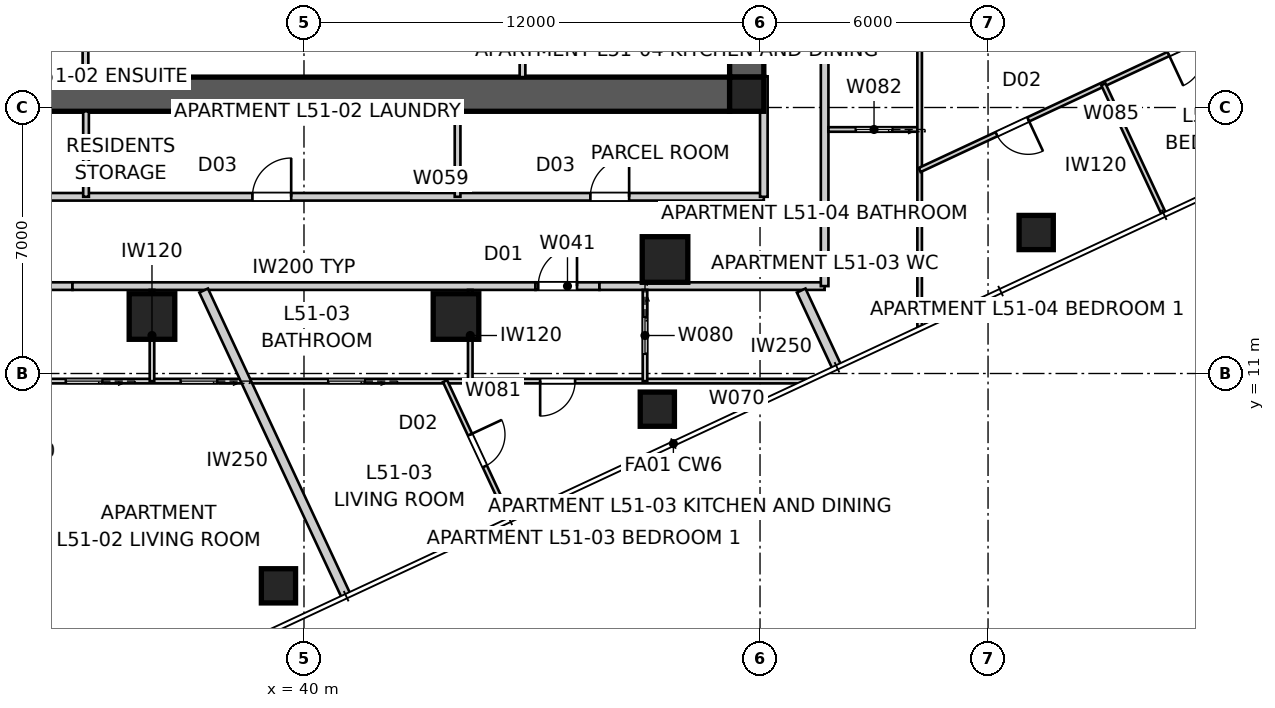
"""IFC4 building model, lengths in metres.
Left out: names, types, materials, properties, quantities, classifications, styles, units other than length and angle.
Written with IfcOpenShell. Run it as: python <this file> out.ifc"""

import sys

from ifc_helpers import new_model, si_unit, direction, frame, frame_2d, origin, origin_2d, place, context, subcontext, project, spatial, polyline, rectangle, outline, extrude, element, fill, save


model = new_model("IFC4")
c1 = context("Model", 3, precision=1e-05, world=origin(), true_north=direction((0.0, 1.0)))
c2 = subcontext(c1, "Body", "Model", "MODEL_VIEW")
j1 = project(units=[si_unit("LENGTHUNIT", "METRE"), si_unit("PLANEANGLEUNIT", "RADIAN")], contexts=[c1])
p1 = place(None, origin())
s1 = spatial("IfcSite", under=j1, at=p1, CompositionType="ELEMENT")
p2 = place(p1, origin())
s2 = spatial("IfcBuilding", under=s1, at=p2, CompositionType="ELEMENT")
p3 = place(p2, frame((0.0, 0.0, 186.2)))
s3 = spatial("IfcBuildingStorey", under=s2, at=p3, CompositionType="ELEMENT", Elevation=186.2)
p4 = place(p3, frame((51.2, 18.35, 0.0), z_axis=(0.0, 0.0, 1.0), x_axis=(-1.0, 0.0, 0.0)))
e1 = element("IfcWall", 1, at=p4, inside=s3, PredefinedType="SHEAR", context=c2, shape_type="SweptSolid", body=[
    extrude(outline(polyline([(0.0, -0.45), (22.4, -0.45), (22.4, -0.025), (22.85, -0.025), (22.85, 0.025), (22.4, 0.025), (22.4, 0.45), (0.0, 0.45), (0.0, 0.025), (-0.45, 0.025), (-0.45, -0.025), (0.0, -0.025), (0.0, -0.45)])), origin(), (0.0, 0.0, 1.0), 3.4),
])
p5 = place(p3, frame((51.65, 18.8, 0.0), z_axis=(0.0, 0.0, 1.0), x_axis=(0.0, 1.0, 0.0)))
e2 = element("IfcWall", 2, at=p5, inside=s3, PredefinedType="SHEAR", context=c2, shape_type="SweptSolid", body=[
    extrude(outline(polyline([(0.0, -0.45), (22.4, -0.45), (22.4, -0.025), (22.85, -0.025), (22.85, 0.025), (22.4, 0.025), (22.4, 0.45), (0.0, 0.45), (0.0, 0.025), (-0.45, 0.025), (-0.45, -0.025), (0.0, -0.025), (0.0, -0.45)])), origin(), (0.0, 0.0, 1.0), 3.4),
])
p6 = place(p5, frame((11.14, 0.0, 0.0)))
e3 = element("IfcOpeningElement", 3, at=p6, cuts=e2, PredefinedType="OPENING", context=c2, shape_type="SweptSolid", body=[
    extrude(rectangle(XDim=1.02, YDim=2.4, at=frame_2d((0.51, 1.2))), frame((0.0, 0.46, 0.0), z_axis=(0.0, -1.0, 0.0), x_axis=(1.0, 0.0, 0.0)), (0.0, 0.0, 1.0), 0.92),
])
for number, where, z_axis, x_axis in (
    (4, (51.65, 18.35, 0.0), (0.0, 0.0, 1.0), (1.0, 0.0, 0.0)),
    (5, (39.328, 5.412, 0.0), (0.0, 0.0, 1.0), (1.0, 0.0, 0.0)),
    (6, (49.298, 10.061, 0.0), (0.0, 0.0, 1.0), (1.0, 0.0, 0.0)),
    (7, (59.267, 14.71, 0.0), (0.0, 0.0, 1.0), (1.0, 0.0, 0.0)),
):
    element("IfcColumn", number, at=place(p3, frame(where, z_axis=z_axis, x_axis=x_axis)), inside=s3, PredefinedType="COLUMN", context=c2, shape_type="SweptSolid", body=[
        extrude(rectangle(XDim=0.9, YDim=0.9, at=origin_2d()), origin(), (0.0, 0.0, 1.0), 3.4),
    ])
for number, where, z_axis, x_axis in (
    (8, (36.0, 12.5, 0.0), (0.0, 0.0, 1.0), (1.0, 0.0, 0.0)),
    (9, (44.0, 12.5, 0.0), (0.0, 0.0, 1.0), (1.0, 0.0, 0.0)),
    (10, (49.5, 14.0, 0.0), (0.0, 0.0, 1.0), (1.0, 0.0, 0.0)),
):
    element("IfcColumn", number, at=place(p3, frame(where, z_axis=z_axis, x_axis=x_axis)), inside=s3, PredefinedType="COLUMN", context=c2, shape_type="SweptSolid", body=[
        extrude(rectangle(XDim=1.2, YDim=1.2, at=origin_2d()), origin(), (0.0, 0.0, 1.0), 3.4),
    ])
p7 = place(p3, frame((32.225, 13.3, 0.0), z_axis=(0.0, 0.0, 1.0), x_axis=(1.0, 0.0, 0.0)))
e11 = element("IfcWall", 11, at=p7, inside=s3, PredefinedType="PARTITIONING", context=c2, shape_type="SweptSolid", body=[
    extrude(rectangle(XDim=1.684, YDim=0.2, at=frame_2d((0.842, 0.0))), origin(), (0.0, 0.0, 1.0), 2.55),
])
p8 = place(p3, frame((33.908, 13.3, 0.0), z_axis=(0.0, 0.0, 1.0), x_axis=(1.0, 0.0, 0.0)))
e12 = element("IfcWall", 12, at=p8, inside=s3, PredefinedType="PARTITIONING", context=c2, shape_type="SweptSolid", body=[
    extrude(rectangle(XDim=12.183, YDim=0.2, at=frame_2d((6.092, 0.0))), origin(), (0.0, 0.0, 1.0), 3.25),
])
p9 = place(p3, frame((46.092, 13.3, 0.0), z_axis=(0.0, 0.0, 1.0), x_axis=(1.0, 0.0, 0.0)))
e13 = element("IfcWall", 13, at=p9, inside=s3, PredefinedType="PARTITIONING", context=c2, shape_type="SweptSolid", body=[
    extrude(rectangle(XDim=1.684, YDim=0.2, at=frame_2d((0.842, 0.0))), origin(), (0.0, 0.0, 1.0), 2.55),
])
p10 = place(p9, frame((0.073, 0.0, 0.0)))
e14 = element("IfcOpeningElement", 14, at=p10, cuts=e13, PredefinedType="OPENING", context=c2, shape_type="SweptSolid", body=[
    extrude(rectangle(XDim=1.02, YDim=2.34, at=frame_2d((0.51, 1.17))), frame((0.0, 0.11, 0.0), z_axis=(0.0, -1.0, 0.0), x_axis=(1.0, 0.0, 0.0)), (0.0, 0.0, 1.0), 0.22),
])
p11 = place(p3, frame((47.775, 13.3, 0.0), z_axis=(0.0, 0.0, 1.0), x_axis=(1.0, 0.0, 0.0)))
e15 = element("IfcWall", 15, at=p11, inside=s3, PredefinedType="PARTITIONING", context=c2, shape_type="SweptSolid", body=[
    extrude(rectangle(XDim=5.925, YDim=0.2, at=frame_2d((2.962, 0.0))), origin(), (0.0, 0.0, 1.0), 3.25),
])
p12 = place(p3, frame((53.7, 13.3, 0.0), z_axis=(0.0, 0.0, 1.0), x_axis=(0.0, 1.0, 0.0)))
e16 = element("IfcWall", 16, at=p12, inside=s3, PredefinedType="PARTITIONING", context=c2, shape_type="SweptSolid", body=[
    extrude(rectangle(XDim=33.8, YDim=0.2, at=frame_2d((16.9, 0.0))), origin(), (0.0, 0.0, 1.0), 3.25),
])
p13 = place(p12, frame((6.984, 0.0, 0.0)))
e17 = element("IfcOpeningElement", 17, at=p13, cuts=e16, PredefinedType="OPENING", context=c2, shape_type="SweptSolid", body=[
    extrude(rectangle(XDim=1.02, YDim=2.34, at=frame_2d((0.51, 1.17))), frame((0.0, 0.11, 0.0), z_axis=(0.0, -1.0, 0.0), x_axis=(1.0, 0.0, 0.0)), (0.0, 0.0, 1.0), 0.22),
])
p14 = place(p12, frame((29.648, 0.0, 0.0)))
e18 = element("IfcOpeningElement", 18, at=p14, cuts=e16, PredefinedType="OPENING", context=c2, shape_type="SweptSolid", body=[
    extrude(rectangle(XDim=1.02, YDim=2.34, at=frame_2d((0.51, 1.17))), frame((0.0, 0.11, 0.0), z_axis=(0.0, -1.0, 0.0), x_axis=(1.0, 0.0, 0.0)), (0.0, 0.0, 1.0), 0.22),
])
p15 = place(p12, frame((15.16, 0.0, 0.0)))
e19 = element("IfcOpeningElement", 19, at=p15, cuts=e16, PredefinedType="OPENING", context=c2, shape_type="SweptSolid", body=[
    extrude(rectangle(XDim=1.02, YDim=2.34, at=frame_2d((0.51, 1.17))), frame((0.0, 0.11, 0.0), z_axis=(0.0, -1.0, 0.0), x_axis=(1.0, 0.0, 0.0)), (0.0, 0.0, 1.0), 0.22),
])
p16 = place(p3, frame((41.11, 5.14, 0.0), z_axis=(0.0, 0.0, 1.0), x_axis=(-0.42262942879, 0.906302579672, 0.0)))
e20 = element("IfcWall", 20, at=p16, inside=s3, PredefinedType="PARTITIONING", context=c2, shape_type="SweptSolid", body=[
    extrude(rectangle(XDim=8.875, YDim=0.25, at=frame_2d((4.438, 0.0))), origin(), (0.0, 0.0, 1.0), 3.25),
])
p17 = place(p3, frame((54.025, 11.162, 0.0), z_axis=(0.0, 0.0, 1.0), x_axis=(-0.422609736898, 0.906311762187, 0.0)))
e21 = element("IfcWall", 21, at=p17, inside=s3, PredefinedType="PARTITIONING", context=c2, shape_type="SweptSolid", body=[
    extrude(rectangle(XDim=2.23, YDim=0.25, at=frame_2d((1.115, 0.0))), origin(), (0.0, 0.0, 1.0), 3.25),
])
p18 = place(p3, frame((45.75, 18.8, 0.0), z_axis=(0.0, 0.0, 1.0), x_axis=(0.0, 1.0, 0.0)))
e22 = element("IfcWall", 22, at=p18, inside=s3, PredefinedType="SOLIDWALL", context=c2, shape_type="SweptSolid", body=[
    extrude(rectangle(XDim=5.95, YDim=0.15, at=frame_2d((2.975, 0.0))), origin(), (0.0, 0.0, 1.0), 3.25),
])
p19 = place(p18, frame((2.515, 0.0, 0.0)))
e23 = element("IfcOpeningElement", 23, at=p19, cuts=e22, PredefinedType="OPENING", context=c2, shape_type="SweptSolid", body=[
    extrude(rectangle(XDim=0.92, YDim=2.1, at=frame_2d((0.46, 1.05))), frame((0.0, 0.085, 0.0), z_axis=(0.0, -1.0, 0.0), x_axis=(1.0, 0.0, 0.0)), (0.0, 0.0, 1.0), 0.17),
])
p20 = place(p3, frame((34.25, 18.8, 0.0), z_axis=(0.0, 0.0, 1.0), x_axis=(0.0, 1.0, 0.0)))
e24 = element("IfcWall", 24, at=p20, inside=s3, PredefinedType="SOLIDWALL", context=c2, shape_type="SweptSolid", body=[
    extrude(rectangle(XDim=5.9, YDim=0.15, at=frame_2d((2.95, 0.0))), origin(), (0.0, 0.0, 1.0), 3.25),
])
p21 = place(p3, frame((27.9, 15.65, 0.0), z_axis=(0.0, 0.0, 1.0), x_axis=(1.0, 0.0, 0.0)))
e25 = element("IfcWall", 25, at=p21, inside=s3, PredefinedType="PARTITIONING", context=c2, shape_type="SweptSolid", body=[
    extrude(rectangle(XDim=24.2, YDim=0.2, at=frame_2d((12.1, 0.0))), origin(), (0.0, 0.0, 1.0), 3.25),
])
p22 = place(p21, frame((10.743, 0.0, 0.0)))
e26 = element("IfcOpeningElement", 26, at=p22, cuts=e25, PredefinedType="OPENING", context=c2, shape_type="SweptSolid", body=[
    extrude(rectangle(XDim=1.02, YDim=2.1, at=frame_2d((0.51, 1.05))), frame((0.0, 0.11, 0.0), z_axis=(0.0, -1.0, 0.0), x_axis=(1.0, 0.0, 0.0)), (0.0, 0.0, 1.0), 0.22),
])
p23 = place(p21, frame((19.636, 0.0, 0.0)))
e27 = element("IfcOpeningElement", 27, at=p23, cuts=e25, PredefinedType="OPENING", context=c2, shape_type="SweptSolid", body=[
    extrude(rectangle(XDim=1.02, YDim=2.1, at=frame_2d((0.51, 1.05))), frame((0.0, 0.11, 0.0), z_axis=(0.0, -1.0, 0.0), x_axis=(1.0, 0.0, 0.0)), (0.0, 0.0, 1.0), 0.22),
])
p24 = place(p21, frame((3.297, 0.0, 0.0)))
e28 = element("IfcOpeningElement", 28, at=p24, cuts=e25, PredefinedType="OPENING", context=c2, shape_type="SweptSolid", body=[
    extrude(rectangle(XDim=1.02, YDim=2.1, at=frame_2d((0.51, 1.05))), frame((0.0, 0.11, 0.0), z_axis=(0.0, -1.0, 0.0), x_axis=(1.0, 0.0, 0.0)), (0.0, 0.0, 1.0), 0.22),
])
p25 = place(p3, frame((52.1, 15.65, 0.0), z_axis=(0.0, 0.0, 1.0), x_axis=(0.0, 1.0, 0.0)))
e29 = element("IfcWall", 29, at=p25, inside=s3, PredefinedType="PARTITIONING", context=c2, shape_type="SweptSolid", body=[
    extrude(rectangle(XDim=3.17, YDim=0.2, at=frame_2d((1.585, 0.0))), origin(), (0.0, 0.0, 1.0), 3.25),
])
p26 = place(p3, frame((34.265, 15.65, 0.0), z_axis=(0.0, 0.0, 1.0), x_axis=(0.0, 1.0, 0.0)))
e30 = element("IfcWall", 30, at=p26, inside=s3, PredefinedType="SOLIDWALL", context=c2, shape_type="SweptSolid", body=[
    extrude(rectangle(XDim=2.25, YDim=0.15, at=frame_2d((1.125, 0.0))), origin(), (0.0, 0.0, 1.0), 2.796),
])
p27 = place(p3, frame((44.042, 15.65, 0.0), z_axis=(0.0, 0.0, 1.0), x_axis=(0.0, 1.0, 0.0)))
e31 = element("IfcWall", 31, at=p27, inside=s3, PredefinedType="SOLIDWALL", context=c2, shape_type="SweptSolid", body=[
    extrude(rectangle(XDim=2.25, YDim=0.15, at=frame_2d((1.125, 0.0))), origin(), (0.0, 0.0, 1.0), 3.25),
])
p28 = place(p3, frame((53.208, 10.8, 0.0), z_axis=(0.0, 0.0, 1.0), x_axis=(-1.0, 0.0, 0.0)))
e32 = element("IfcWall", 32, at=p28, inside=s3, PredefinedType="PARTITIONING", context=c2, shape_type="SweptSolid", body=[
    extrude(rectangle(XDim=29.593, YDim=0.12, at=frame_2d((14.796, 0.0))), origin(), (0.0, 0.0, 1.0), 3.25),
])
p29 = place(p28, frame((6.074, 0.0, 0.0)))
e33 = element("IfcOpeningElement", 33, at=p29, cuts=e32, PredefinedType="OPENING", context=c2, shape_type="SweptSolid", body=[
    extrude(rectangle(XDim=0.92, YDim=2.34, at=frame_2d((0.46, 1.17))), frame((0.0, 0.07, 0.0), z_axis=(0.0, -1.0, 0.0), x_axis=(1.0, 0.0, 0.0)), (0.0, 0.0, 1.0), 0.14),
])
p30 = place(p28, frame((25.566, 0.0, 0.0)))
e34 = element("IfcOpeningElement", 34, at=p30, cuts=e32, PredefinedType="OPENING", context=c2, shape_type="SweptSolid", body=[
    extrude(rectangle(XDim=0.92, YDim=2.34, at=frame_2d((0.46, 1.17))), frame((0.0, 0.07, 0.0), z_axis=(0.0, -1.0, 0.0), x_axis=(1.0, 0.0, 0.0)), (0.0, 0.0, 1.0), 0.14),
])
p31 = place(p28, frame((18.515, 0.0, 0.0)))
e35 = element("IfcOpeningElement", 35, at=p31, cuts=e32, PredefinedType="OPENING", context=c2, shape_type="SweptSolid", body=[
    extrude(rectangle(XDim=0.96, YDim=2.1, at=frame_2d((0.48, 1.05))), frame((0.0, 0.07, 0.0), z_axis=(0.0, -1.0, 0.0), x_axis=(1.0, 0.0, 0.0)), (0.0, 0.0, 1.0), 0.14),
])
p32 = place(p28, frame((15.493, 0.0, 0.0)))
e36 = element("IfcOpeningElement", 36, at=p32, cuts=e32, PredefinedType="OPENING", context=c2, shape_type="SweptSolid", body=[
    extrude(rectangle(XDim=0.96, YDim=2.1, at=frame_2d((0.48, 1.05))), frame((0.0, 0.07, 0.0), z_axis=(0.0, -1.0, 0.0), x_axis=(1.0, 0.0, 0.0)), (0.0, 0.0, 1.0), 0.14),
])
p33 = place(p28, frame((11.609, 0.0, 0.0)))
e37 = element("IfcOpeningElement", 37, at=p33, cuts=e32, PredefinedType="OPENING", context=c2, shape_type="SweptSolid", body=[
    extrude(rectangle(XDim=0.96, YDim=2.1, at=frame_2d((0.48, 1.05))), frame((0.0, 0.07, 0.0), z_axis=(0.0, -1.0, 0.0), x_axis=(1.0, 0.0, 0.0)), (0.0, 0.0, 1.0), 0.14),
])
for number, where, z_axis, x_axis in (
    (38, (36.0, 13.2, 0.0), (0.0, 0.0, 1.0), (0.0, -1.0, 0.0)),
    (39, (44.375, 10.8, 0.0), (0.0, 0.0, 1.0), (0.0, 1.0, 0.0)),
):
    element("IfcWall", number, at=place(p3, frame(where, z_axis=z_axis, x_axis=x_axis)), inside=s3, PredefinedType="PARTITIONING", context=c2, shape_type="SweptSolid", body=[
        extrude(rectangle(XDim=2.4, YDim=0.12, at=frame_2d((1.2, 0.0))), origin(), (0.0, 0.0, 1.0), 3.25),
    ])
p34 = place(p3, frame((48.973, 13.2, 0.0), z_axis=(0.0, 0.0, 1.0), x_axis=(0.0, -1.0, 0.0)))
e40 = element("IfcWall", 40, at=p34, inside=s3, PredefinedType="PARTITIONING", context=c2, shape_type="SweptSolid", body=[
    extrude(rectangle(XDim=2.4, YDim=0.12, at=frame_2d((1.2, 0.0))), origin(), (0.0, 0.0, 1.0), 3.25),
])
p35 = place(p34, frame((0.72, 0.0, 0.0)))
e41 = element("IfcOpeningElement", 41, at=p35, cuts=e40, PredefinedType="OPENING", context=c2, shape_type="SweptSolid", body=[
    extrude(rectangle(XDim=0.96, YDim=2.1, at=frame_2d((0.48, 1.05))), frame((0.0, 0.07, 0.0), z_axis=(0.0, -1.0, 0.0), x_axis=(1.0, 0.0, 0.0)), (0.0, 0.0, 1.0), 0.14),
])
p36 = place(p3, frame((43.712, 10.8, 0.0), z_axis=(0.0, 0.0, 1.0), x_axis=(0.422620823304, -0.906306592556, 0.0)))
e42 = element("IfcWall", 42, at=p36, inside=s3, PredefinedType="PARTITIONING", context=c2, shape_type="SweptSolid", body=[
    extrude(rectangle(XDim=3.99, YDim=0.12, at=frame_2d((1.995, 0.0))), origin(), (0.0, 0.0, 1.0), 3.25),
])
p37 = place(p36, frame((1.555, 0.0, 0.0)))
e43 = element("IfcOpeningElement", 43, at=p37, cuts=e42, PredefinedType="OPENING", context=c2, shape_type="SweptSolid", body=[
    extrude(rectangle(XDim=0.92, YDim=2.34, at=frame_2d((0.46, 1.17))), frame((0.0, 0.07, 0.0), z_axis=(0.0, -1.0, 0.0), x_axis=(1.0, 0.0, 0.0)), (0.0, 0.0, 1.0), 0.14),
])
p38 = place(p3, frame((56.2, 17.422, 0.0), z_axis=(0.0, 0.0, 1.0), x_axis=(-1.0, 0.0, 0.0)))
e44 = element("IfcWall", 44, at=p38, inside=s3, PredefinedType="PARTITIONING", context=c2, shape_type="SweptSolid", body=[
    extrude(rectangle(XDim=2.4, YDim=0.12, at=frame_2d((1.2, 0.0))), origin(), (0.0, 0.0, 1.0), 3.25),
])
p39 = place(p38, frame((0.72, 0.0, 0.0)))
e45 = element("IfcOpeningElement", 45, at=p39, cuts=e44, PredefinedType="OPENING", context=c2, shape_type="SweptSolid", body=[
    extrude(rectangle(XDim=0.96, YDim=2.1, at=frame_2d((0.48, 1.05))), frame((0.0, 0.07, 0.0), z_axis=(0.0, -1.0, 0.0), x_axis=(1.0, 0.0, 0.0)), (0.0, 0.0, 1.0), 0.14),
])
p40 = place(p3, frame((56.2, 49.642, 0.0), z_axis=(0.0, 0.0, 1.0), x_axis=(0.0, -1.0, 0.0)))
e46 = element("IfcWall", 46, at=p40, inside=s3, PredefinedType="PARTITIONING", context=c2, shape_type="SweptSolid", body=[
    extrude(rectangle(XDim=37.421, YDim=0.12, at=frame_2d((18.71, 0.0))), origin(), (0.0, 0.0, 1.0), 2.55),
])
p41 = place(p40, frame((27.488, 0.0, 0.0)))
e47 = element("IfcOpeningElement", 47, at=p41, cuts=e46, PredefinedType="OPENING", context=c2, shape_type="SweptSolid", body=[
    extrude(rectangle(XDim=0.92, YDim=2.34, at=frame_2d((0.46, 1.17))), frame((0.0, 0.07, 0.0), z_axis=(0.0, -1.0, 0.0), x_axis=(1.0, 0.0, 0.0)), (0.0, 0.0, 1.0), 0.14),
])
p42 = place(p40, frame((5.08, 0.0, 0.0)))
e48 = element("IfcOpeningElement", 48, at=p42, cuts=e46, PredefinedType="OPENING", context=c2, shape_type="SweptSolid", body=[
    extrude(rectangle(XDim=0.92, YDim=2.34, at=frame_2d((0.46, 1.17))), frame((0.0, 0.07, 0.0), z_axis=(0.0, -1.0, 0.0), x_axis=(1.0, 0.0, 0.0)), (0.0, 0.0, 1.0), 0.14),
])
p43 = place(p40, frame((19.592, 0.0, 0.0)))
e49 = element("IfcOpeningElement", 49, at=p43, cuts=e46, PredefinedType="OPENING", context=c2, shape_type="SweptSolid", body=[
    extrude(rectangle(XDim=0.92, YDim=2.34, at=frame_2d((0.46, 1.17))), frame((0.0, 0.07, 0.0), z_axis=(0.0, -1.0, 0.0), x_axis=(1.0, 0.0, 0.0)), (0.0, 0.0, 1.0), 0.14),
])
p44 = place(p3, frame((65.303, 20.6, 0.0), z_axis=(0.0, 0.0, 1.0), x_axis=(-0.906300466163, -0.422633961049, 0.0)))
e50 = element("IfcWall", 50, at=p44, inside=s3, PredefinedType="PARTITIONING", context=c2, shape_type="SweptSolid", body=[
    extrude(rectangle(XDim=10.044, YDim=0.12, at=frame_2d((5.022, 0.0))), origin(), (0.0, 0.0, 1.0), 3.25),
])
p45 = place(p44, frame((6.892, 0.0, 0.0)))
e51 = element("IfcOpeningElement", 51, at=p45, cuts=e50, PredefinedType="OPENING", context=c2, shape_type="SweptSolid", body=[
    extrude(rectangle(XDim=0.92, YDim=2.34, at=frame_2d((0.46, 1.17))), frame((0.0, 0.07, 0.0), z_axis=(0.0, -1.0, 0.0), x_axis=(1.0, 0.0, 0.0)), (0.0, 0.0, 1.0), 0.14),
])
p46 = place(p44, frame((1.9, 0.0, 0.0)))
e52 = element("IfcOpeningElement", 52, at=p46, cuts=e50, PredefinedType="OPENING", context=c2, shape_type="SweptSolid", body=[
    extrude(rectangle(XDim=0.92, YDim=2.34, at=frame_2d((0.46, 1.17))), frame((0.0, 0.07, 0.0), z_axis=(0.0, -1.0, 0.0), x_axis=(1.0, 0.0, 0.0)), (0.0, 0.0, 1.0), 0.14),
])
p47 = place(p3, frame((61.035, 18.609, 0.0), z_axis=(0.0, 0.0, 1.0), x_axis=(0.422600090785, -0.906316260071, 0.0)))
e53 = element("IfcWall", 53, at=p47, inside=s3, PredefinedType="PARTITIONING", context=c2, shape_type="SweptSolid", body=[
    extrude(rectangle(XDim=3.747, YDim=0.12, at=frame_2d((1.874, 0.0))), origin(), (0.0, 0.0, 1.0), 3.25),
])
p48 = place(p22, origin())
e54 = element("IfcDoor", 54, at=p48, inside=s3, OperationType="SINGLE_SWING_RIGHT", PredefinedType="DOOR", context=c2, shape_type="SweptSolid", body=[
    extrude(rectangle(XDim=1.02, YDim=2.1, at=frame_2d((0.51, 1.05))), frame((0.0, 0.025, 0.0), z_axis=(0.0, -1.0, 0.0), x_axis=(1.0, 0.0, 0.0)), (0.0, 0.0, 1.0), 0.05),
])
fill(e26, e54)
p49 = place(p23, origin())
e55 = element("IfcDoor", 55, at=p49, inside=s3, OperationType="SINGLE_SWING_RIGHT", PredefinedType="DOOR", context=c2, shape_type="SweptSolid", body=[
    extrude(rectangle(XDim=1.02, YDim=2.1, at=frame_2d((0.51, 1.05))), frame((0.0, 0.025, 0.0), z_axis=(0.0, -1.0, 0.0), x_axis=(1.0, 0.0, 0.0)), (0.0, 0.0, 1.0), 0.05),
])
fill(e27, e55)
p50 = place(p10, origin())
e56 = element("IfcDoor", 56, at=p50, inside=s3, OperationType="SINGLE_SWING_RIGHT", PredefinedType="DOOR", context=c2, shape_type="SweptSolid", body=[
    extrude(rectangle(XDim=1.02, YDim=2.34, at=frame_2d((0.51, 1.17))), frame((0.0, 0.025, 0.0), z_axis=(0.0, -1.0, 0.0), x_axis=(1.0, 0.0, 0.0)), (0.0, 0.0, 1.0), 0.05),
])
fill(e14, e56)
p51 = place(p39, origin())
e57 = element("IfcDoor", 57, at=p51, inside=s3, OperationType="SLIDING_TO_LEFT", PredefinedType="DOOR", context=c2, shape_type="SweptSolid", body=[
    extrude(rectangle(XDim=0.96, YDim=2.1, at=frame_2d((0.48, 1.05))), frame((0.0, 0.025, 0.0), z_axis=(0.0, -1.0, 0.0), x_axis=(1.0, 0.0, 0.0)), (0.0, 0.0, 1.0), 0.05),
])
fill(e45, e57)
p52 = place(p29, origin())
e58 = element("IfcDoor", 58, at=p52, inside=s3, OperationType="SINGLE_SWING_RIGHT", PredefinedType="DOOR", context=c2, shape_type="SweptSolid", body=[
    extrude(rectangle(XDim=0.92, YDim=2.34, at=frame_2d((0.46, 1.17))), frame((0.0, 0.025, 0.0), z_axis=(0.0, -1.0, 0.0), x_axis=(1.0, 0.0, 0.0)), (0.0, 0.0, 1.0), 0.05),
])
fill(e33, e58)
p53 = place(p35, origin())
e59 = element("IfcDoor", 59, at=p53, inside=s3, OperationType="SLIDING_TO_LEFT", PredefinedType="DOOR", context=c2, shape_type="SweptSolid", body=[
    extrude(rectangle(XDim=0.96, YDim=2.1, at=frame_2d((0.48, 1.05))), frame((0.0, 0.025, 0.0), z_axis=(0.0, -1.0, 0.0), x_axis=(1.0, 0.0, 0.0)), (0.0, 0.0, 1.0), 0.05),
])
fill(e41, e59)
p54 = place(p45, origin())
e60 = element("IfcDoor", 60, at=p54, inside=s3, OperationType="SINGLE_SWING_LEFT", PredefinedType="DOOR", context=c2, shape_type="SweptSolid", body=[
    extrude(rectangle(XDim=0.92, YDim=2.34, at=frame_2d((0.46, 1.17))), frame((0.0, 0.025, 0.0), z_axis=(0.0, -1.0, 0.0), x_axis=(1.0, 0.0, 0.0)), (0.0, 0.0, 1.0), 0.05),
])
fill(e51, e60)
p55 = place(p46, origin())
e61 = element("IfcDoor", 61, at=p55, inside=s3, OperationType="SINGLE_SWING_RIGHT", PredefinedType="DOOR", context=c2, shape_type="SweptSolid", body=[
    extrude(rectangle(XDim=0.92, YDim=2.34, at=frame_2d((0.46, 1.17))), frame((0.0, 0.025, 0.0), z_axis=(0.0, -1.0, 0.0), x_axis=(1.0, 0.0, 0.0)), (0.0, 0.0, 1.0), 0.05),
])
fill(e52, e61)
p56 = place(p31, origin())
e62 = element("IfcDoor", 62, at=p56, inside=s3, OperationType="SLIDING_TO_LEFT", PredefinedType="DOOR", context=c2, shape_type="SweptSolid", body=[
    extrude(rectangle(XDim=0.96, YDim=2.1, at=frame_2d((0.48, 1.05))), frame((0.0, 0.025, 0.0), z_axis=(0.0, -1.0, 0.0), x_axis=(1.0, 0.0, 0.0)), (0.0, 0.0, 1.0), 0.05),
])
fill(e35, e62)
p57 = place(p32, origin())
e63 = element("IfcDoor", 63, at=p57, inside=s3, OperationType="SLIDING_TO_LEFT", PredefinedType="DOOR", context=c2, shape_type="SweptSolid", body=[
    extrude(rectangle(XDim=0.96, YDim=2.1, at=frame_2d((0.48, 1.05))), frame((0.0, 0.025, 0.0), z_axis=(0.0, -1.0, 0.0), x_axis=(1.0, 0.0, 0.0)), (0.0, 0.0, 1.0), 0.05),
])
fill(e36, e63)
p58 = place(p37, origin())
e64 = element("IfcDoor", 64, at=p58, inside=s3, OperationType="SINGLE_SWING_LEFT", PredefinedType="DOOR", context=c2, shape_type="SweptSolid", body=[
    extrude(rectangle(XDim=0.92, YDim=2.34, at=frame_2d((0.46, 1.17))), frame((0.0, 0.025, 0.0), z_axis=(0.0, -1.0, 0.0), x_axis=(1.0, 0.0, 0.0)), (0.0, 0.0, 1.0), 0.05),
])
fill(e43, e64)
p59 = place(p33, origin())
e65 = element("IfcDoor", 65, at=p59, inside=s3, OperationType="SLIDING_TO_LEFT", PredefinedType="DOOR", context=c2, shape_type="SweptSolid", body=[
    extrude(rectangle(XDim=0.96, YDim=2.1, at=frame_2d((0.48, 1.05))), frame((0.0, 0.025, 0.0), z_axis=(0.0, -1.0, 0.0), x_axis=(1.0, 0.0, 0.0)), (0.0, 0.0, 1.0), 0.05),
])
fill(e37, e65)
save(model, sys.argv[1])
